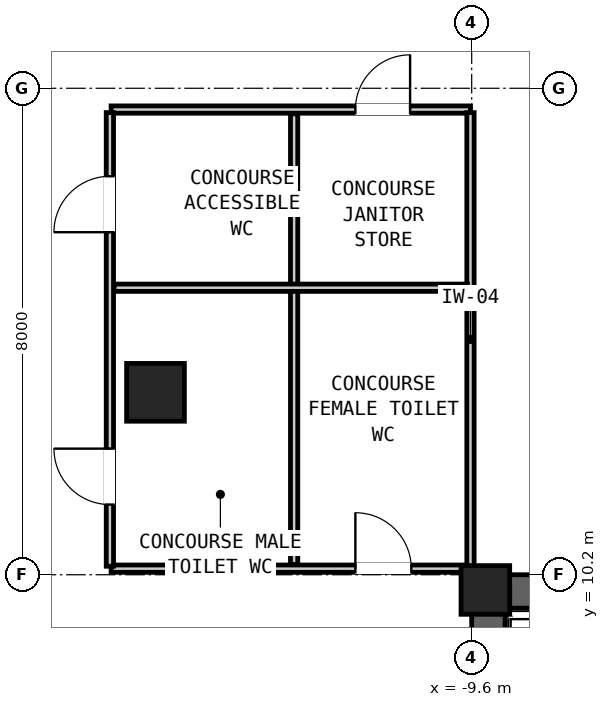
"""IFC4 building model, lengths in metres.
Left out: names, types, materials, properties, quantities, classifications, styles, units other than length and angle.
Written with IfcOpenShell. Run it as: python <this file> out.ifc"""

import sys

from ifc_helpers import new_model, si_unit, direction, frame, frame_2d, origin, origin_2d, place, context, subcontext, project, spatial, rectangle, hollow_rectangle, extrude, element, fill, save


model = new_model("IFC4")
c1 = context("Model", 3, precision=1e-05, world=origin(), true_north=direction((0.0, 1.0)))
c2 = subcontext(c1, "Body", "Model", "MODEL_VIEW")
j1 = project(units=[si_unit("LENGTHUNIT", "METRE"), si_unit("PLANEANGLEUNIT", "RADIAN")], contexts=[c1])
p1 = place(None, origin())
s1 = spatial("IfcSite", under=j1, at=p1, CompositionType="ELEMENT")
p2 = place(p1, origin())
s2 = spatial("IfcBuilding", under=s1, at=p2, CompositionType="ELEMENT")
p3 = place(p2, origin())
s3 = spatial("IfcBuildingStorey", under=s2, at=p3, CompositionType="ELEMENT", Elevation=0.0)
p4 = place(p3, frame((-9.6, 9.925, 0.0), z_axis=(0.0, 0.0, 1.0), x_axis=(1.0, 0.0, 0.0)))
e1 = element("IfcWall", 1, at=p4, inside=s3, PredefinedType="SHEAR", context=c2, shape_type="SweptSolid", body=[
    extrude(rectangle(XDim=19.2, YDim=0.55, at=frame_2d((9.6, 0.0))), origin(), (0.0, 0.0, 1.0), 5.1),
])
p5 = place(p3, frame((-9.325, 3.6, 0.0), z_axis=(0.0, 0.0, 1.0), x_axis=(0.0, 1.0, 0.0)))
e2 = element("IfcWall", 2, at=p5, inside=s3, PredefinedType="SHEAR", context=c2, shape_type="SweptSolid", body=[
    extrude(rectangle(XDim=6.6, YDim=0.55, at=frame_2d((3.3, 0.0))), origin(), (0.0, 0.0, 1.0), 5.1),
])
p6 = place(p3, frame((-14.8, 13.2, 0.0), z_axis=(0.0, 0.0, 1.0), x_axis=(1.0, 0.0, 0.0)))
e3 = element("IfcColumn", 3, at=p6, inside=s3, PredefinedType="COLUMN", context=c2, shape_type="SweptSolid", body=[
    extrude(hollow_rectangle(XDim=0.95, YDim=0.95, WallThickness=0.06, at=origin_2d()), origin(), (0.0, 0.0, 1.0), 5.1),
])
p7 = place(p3, frame((-9.375, 9.95, 0.0), z_axis=(0.0, 0.0, 1.0), x_axis=(1.0, 0.0, 0.0)))
e4 = element("IfcColumn", 4, at=p7, inside=s3, PredefinedType="COLUMN", context=c2, shape_type="SweptSolid", body=[
    extrude(rectangle(XDim=0.8, YDim=0.8, at=origin_2d()), origin(), (0.0, 0.0, 1.0), 5.1),
])
p8 = place(p3, frame((-15.53, 10.3, 0.0), z_axis=(0.0, 0.0, 1.0), x_axis=(1.0, 0.0, 0.0)))
e5 = element("IfcWall", 5, at=p8, inside=s3, PredefinedType="PARTITIONING", context=c2, shape_type="SweptSolid", body=[
    extrude(rectangle(XDim=5.91, YDim=0.12, at=frame_2d((2.955, 0.0))), origin(), (0.0, 0.0, 1.0), 4.78),
])
p9 = place(p8, frame((4.017, 0.0, 0.0)))
e6 = element("IfcOpeningElement", 6, at=p9, cuts=e5, PredefinedType="OPENING", context=c2, shape_type="SweptSolid", body=[
    extrude(rectangle(XDim=0.92, YDim=2.1, at=frame_2d((0.46, 1.05))), frame((0.0, 0.072, 0.0), z_axis=(0.0, -1.0, 0.0), x_axis=(1.0, 0.0, 0.0)), (0.0, 0.0, 1.0), 0.144),
])
p10 = place(p3, frame((-15.53, 17.85, 0.0), z_axis=(0.0, 0.0, 1.0), x_axis=(1.0, 0.0, 0.0)))
e7 = element("IfcWall", 7, at=p10, inside=s3, PredefinedType="PARTITIONING", context=c2, shape_type="SweptSolid", body=[
    extrude(rectangle(XDim=5.91, YDim=0.12, at=frame_2d((2.955, 0.0))), origin(), (0.0, 0.0, 1.0), 4.78),
])
p11 = place(p10, frame((4.017, 0.0, 0.0)))
e8 = element("IfcOpeningElement", 8, at=p11, cuts=e7, PredefinedType="OPENING", context=c2, shape_type="SweptSolid", body=[
    extrude(rectangle(XDim=0.9, YDim=2.05, at=frame_2d((0.45, 1.025))), frame((0.0, 0.072, 0.0), z_axis=(0.0, -1.0, 0.0), x_axis=(1.0, 0.0, 0.0)), (0.0, 0.0, 1.0), 0.144),
])
p12 = place(p3, frame((-9.62, 10.34, 0.0), z_axis=(0.0, 0.0, 1.0), x_axis=(0.0, 1.0, 0.0)))
e9 = element("IfcWall", 9, at=p12, inside=s3, PredefinedType="PARTITIONING", context=c2, shape_type="SweptSolid", body=[
    extrude(rectangle(XDim=7.46, YDim=0.12, at=frame_2d((3.73, 0.0))), origin(), (0.0, 0.0, 1.0), 4.78),
])
p13 = place(p3, frame((-12.52, 10.37, 0.0), z_axis=(0.0, 0.0, 1.0), x_axis=(0.0, 1.0, 0.0)))
e10 = element("IfcWall", 10, at=p13, inside=s3, PredefinedType="PARTITIONING", context=c2, shape_type="SweptSolid", body=[
    extrude(rectangle(XDim=7.41, YDim=0.12, at=frame_2d((3.705, 0.0))), origin(), (0.0, 0.0, 1.0), 4.78),
])
p14 = place(p3, frame((-15.48, 14.92, 0.0), z_axis=(0.0, 0.0, 1.0), x_axis=(1.0, 0.0, 0.0)))
e11 = element("IfcWall", 11, at=p14, inside=s3, PredefinedType="PARTITIONING", context=c2, shape_type="SweptSolid", body=[
    extrude(rectangle(XDim=5.81, YDim=0.12, at=frame_2d((2.905, 0.0))), origin(), (0.0, 0.0, 1.0), 4.78),
])
p15 = place(p3, frame((-15.55, 10.34, 0.0), z_axis=(0.0, 0.0, 1.0), x_axis=(0.0, 1.0, 0.0)))
e12 = element("IfcWall", 12, at=p15, inside=s3, PredefinedType="PARTITIONING", context=c2, shape_type="SweptSolid", body=[
    extrude(rectangle(XDim=7.46, YDim=0.12, at=frame_2d((3.73, 0.0))), origin(), (0.0, 0.0, 1.0), 4.78),
])
p16 = place(p15, frame((1.014, 0.0, 0.0)))
e13 = element("IfcOpeningElement", 13, at=p16, cuts=e12, PredefinedType="OPENING", context=c2, shape_type="SweptSolid", body=[
    extrude(rectangle(XDim=0.92, YDim=2.1, at=frame_2d((0.46, 1.05))), frame((0.0, 0.072, 0.0), z_axis=(0.0, -1.0, 0.0), x_axis=(1.0, 0.0, 0.0)), (0.0, 0.0, 1.0), 0.144),
])
p17 = place(p15, frame((5.493, 0.0, 0.0)))
e14 = element("IfcOpeningElement", 14, at=p17, cuts=e12, PredefinedType="OPENING", context=c2, shape_type="SweptSolid", body=[
    extrude(rectangle(XDim=0.92, YDim=2.1, at=frame_2d((0.46, 1.05))), frame((0.0, 0.072, 0.0), z_axis=(0.0, -1.0, 0.0), x_axis=(1.0, 0.0, 0.0)), (0.0, 0.0, 1.0), 0.144),
])
p18 = place(p9, origin())
e15 = element("IfcDoor", 15, at=p18, inside=s3, OperationType="SINGLE_SWING_LEFT", PredefinedType="DOOR", context=c2, shape_type="SweptSolid", body=[
    extrude(rectangle(XDim=0.92, YDim=2.1, at=frame_2d((0.46, 1.05))), frame((0.0, 0.025, 0.0), z_axis=(0.0, -1.0, 0.0), x_axis=(1.0, 0.0, 0.0)), (0.0, 0.0, 1.0), 0.05),
])
fill(e6, e15)
p19 = place(p11, origin())
e16 = element("IfcDoor", 16, at=p19, inside=s3, OperationType="SINGLE_SWING_RIGHT", PredefinedType="DOOR", context=c2, shape_type="SweptSolid", body=[
    extrude(rectangle(XDim=0.9, YDim=2.05, at=frame_2d((0.45, 1.025))), frame((0.0, 0.025, 0.0), z_axis=(0.0, -1.0, 0.0), x_axis=(1.0, 0.0, 0.0)), (0.0, 0.0, 1.0), 0.05),
])
fill(e8, e16)
p20 = place(p16, origin())
e17 = element("IfcDoor", 17, at=p20, inside=s3, OperationType="SINGLE_SWING_RIGHT", PredefinedType="DOOR", context=c2, shape_type="SweptSolid", body=[
    extrude(rectangle(XDim=0.92, YDim=2.1, at=frame_2d((0.46, 1.05))), frame((0.0, 0.025, 0.0), z_axis=(0.0, -1.0, 0.0), x_axis=(1.0, 0.0, 0.0)), (0.0, 0.0, 1.0), 0.05),
])
fill(e13, e17)
p21 = place(p17, origin())
e18 = element("IfcDoor", 18, at=p21, inside=s3, OperationType="SINGLE_SWING_LEFT", PredefinedType="DOOR", context=c2, shape_type="SweptSolid", body=[
    extrude(rectangle(XDim=0.92, YDim=2.1, at=frame_2d((0.46, 1.05))), frame((0.0, 0.025, 0.0), z_axis=(0.0, -1.0, 0.0), x_axis=(1.0, 0.0, 0.0)), (0.0, 0.0, 1.0), 0.05),
])
fill(e14, e18)
save(model, sys.argv[1])
